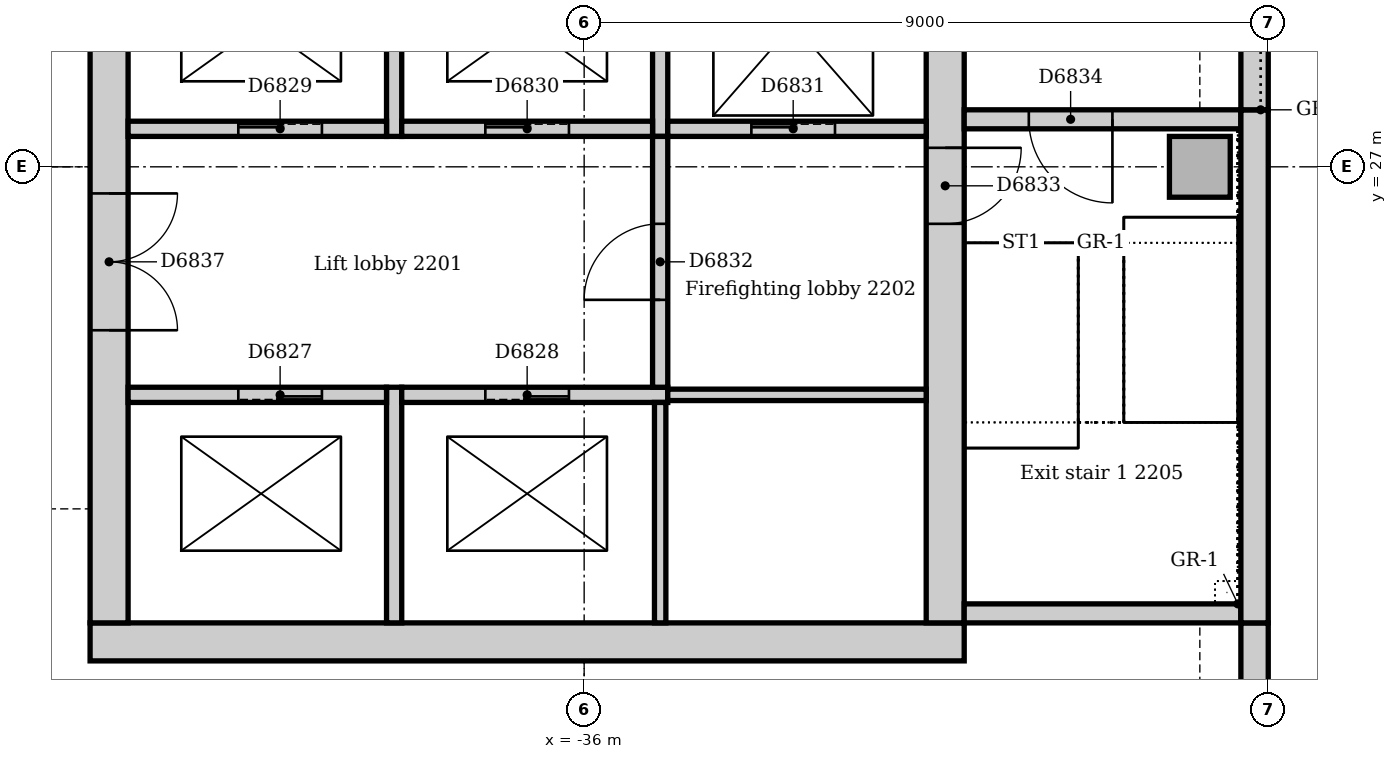
"""IFC4 building model, lengths in metres.
Left out: names, types, materials, properties, quantities, classifications, styles, units other than length and angle.
Written with IfcOpenShell. Run it as: python <this file> out.ifc"""

import sys

from ifc_helpers import new_model, si_unit, direction, frame, frame_2d, origin, origin_2d, place, context, subcontext, project, spatial, rectangle, extrude, element, fill, save


model = new_model("IFC4")
c1 = context("Model", 3, precision=1e-05, world=origin(), true_north=direction((0.0, 1.0)))
c2 = subcontext(c1, "Body", "Model", "MODEL_VIEW")
j1 = project(units=[si_unit("LENGTHUNIT", "METRE"), si_unit("PLANEANGLEUNIT", "RADIAN")], contexts=[c1])
p1 = place(None, origin())
s1 = spatial("IfcSite", under=j1, at=p1, CompositionType="ELEMENT")
p2 = place(p1, origin())
s2 = spatial("IfcBuilding", under=s1, at=p2, CompositionType="ELEMENT")
p3 = place(p2, frame((0.0, 0.0, 95.0)))
s3 = spatial("IfcBuildingStorey", under=s2, at=p3, CompositionType="ELEMENT", Elevation=95.0)
p4 = place(p3, frame((-42.5, 20.75, 0.0), z_axis=(0.0, 0.0, 1.0), x_axis=(1.0, 0.0, 0.0)))
e1 = element("IfcWall", 1, at=p4, inside=s3, PredefinedType="SOLIDWALL", context=c2, shape_type="SweptSolid", body=[
    extrude(rectangle(XDim=11.5, YDim=0.5, at=frame_2d((5.75, 0.0))), origin(), (0.0, 0.0, 1.0), 5.0),
])
p5 = place(p3, frame((-31.25, 21.0, 0.0), z_axis=(0.0, 0.0, 1.0), x_axis=(0.0, 1.0, 0.0)))
e2 = element("IfcWall", 2, at=p5, inside=s3, PredefinedType="SOLIDWALL", context=c2, shape_type="SweptSolid", body=[
    extrude(rectangle(XDim=9.5, YDim=0.5, at=frame_2d((4.75, 0.0))), origin(), (0.0, 0.0, 1.0), 5.0),
])
p6 = place(p5, frame((5.25, 0.0, 0.0)))
e3 = element("IfcOpeningElement", 3, at=p6, cuts=e2, PredefinedType="OPENING", context=c2, shape_type="SweptSolid", body=[
    extrude(rectangle(XDim=1.0, YDim=2.1, at=frame_2d((0.5, 1.05))), frame((0.0, 0.26, 0.0), z_axis=(0.0, -1.0, 0.0), x_axis=(1.0, 0.0, 0.0)), (0.0, 0.0, 1.0), 0.52),
])
p7 = place(p3, frame((-42.25, 30.5, 0.0), z_axis=(0.0, 0.0, 1.0), x_axis=(0.0, -1.0, 0.0)))
e4 = element("IfcWall", 4, at=p7, inside=s3, PredefinedType="SOLIDWALL", context=c2, shape_type="SweptSolid", body=[
    extrude(rectangle(XDim=9.5, YDim=0.5, at=frame_2d((4.75, 0.0))), origin(), (0.0, 0.0, 1.0), 5.0),
])
p8 = place(p7, frame((3.85, 0.0, 0.0)))
e5 = element("IfcOpeningElement", 5, at=p8, cuts=e4, PredefinedType="OPENING", context=c2, shape_type="SweptSolid", body=[
    extrude(rectangle(XDim=1.8, YDim=2.1, at=frame_2d((0.9, 1.05))), frame((0.0, 0.26, 0.0), z_axis=(0.0, -1.0, 0.0), x_axis=(1.0, 0.0, 0.0)), (0.0, 0.0, 1.0), 0.52),
])
p9 = place(p3, frame((-31.0, 21.125, 0.0), z_axis=(0.0, 0.0, 1.0), x_axis=(1.0, 0.0, 0.0)))
e6 = element("IfcWall", 6, at=p9, inside=s3, PredefinedType="SOLIDWALL", context=c2, shape_type="SweptSolid", body=[
    extrude(rectangle(XDim=3.64, YDim=0.25, at=frame_2d((1.82, 0.0))), origin(), (0.0, 0.0, 1.0), 5.0),
])
p10 = place(p3, frame((-27.36, 27.625, 0.0), z_axis=(0.0, 0.0, 1.0), x_axis=(-1.0, 0.0, 0.0)))
e7 = element("IfcWall", 7, at=p10, inside=s3, PredefinedType="SOLIDWALL", context=c2, shape_type="SweptSolid", body=[
    extrude(rectangle(XDim=3.64, YDim=0.25, at=frame_2d((1.82, 0.0))), origin(), (0.0, 0.0, 1.0), 5.0),
])
p11 = place(p10, frame((1.69, 0.0, 0.0)))
e8 = element("IfcOpeningElement", 8, at=p11, cuts=e7, PredefinedType="OPENING", context=c2, shape_type="SweptSolid", body=[
    extrude(rectangle(XDim=1.1, YDim=2.1, at=frame_2d((0.55, 1.05))), frame((0.0, 0.135, 0.0), z_axis=(0.0, -1.0, 0.0), x_axis=(1.0, 0.0, 0.0)), (0.0, 0.0, 1.0), 0.27),
])
p12 = place(p3, frame((-27.9, 27.0, 0.0), z_axis=(0.0, 0.0, 1.0), x_axis=(1.0, 0.0, 0.0)))
e9 = element("IfcColumn", 9, at=p12, inside=s3, PredefinedType="COLUMN", context=c2, shape_type="SweptSolid", body=[
    extrude(rectangle(XDim=0.8, YDim=0.8, at=origin_2d()), origin(), (0.0, 0.0, 1.0), 5.0),
])
p13 = place(p3, frame((-27.18, 13.243, 0.0), z_axis=(0.0, 0.0, 1.0), x_axis=(0.0, 1.0, 0.0)))
e10 = element("IfcWall", 10, at=p13, inside=s3, PredefinedType="STANDARD", context=c2, shape_type="SweptSolid", body=[
    extrude(rectangle(XDim=7.757, YDim=0.36, at=frame_2d((3.879, 0.0))), origin(), (0.0, 0.0, 1.0), 4.85),
])
p14 = place(p13, frame((3.404, 0.0, 0.9)))
e11 = element("IfcOpeningElement", 11, at=p14, cuts=e10, PredefinedType="OPENING", context=c2, shape_type="SweptSolid", body=[
    extrude(rectangle(XDim=1.8, YDim=2.2, at=frame_2d((0.9, 1.1))), frame((0.0, 0.19, 0.0), z_axis=(0.0, -1.0, 0.0), x_axis=(1.0, 0.0, 0.0)), (0.0, 0.0, 1.0), 0.38),
])
p15 = place(p3, frame((-27.18, 21.0, 0.0), z_axis=(0.0, 0.0, 1.0), x_axis=(0.0, 1.0, 0.0)))
e12 = element("IfcWall", 12, at=p15, inside=s3, PredefinedType="STANDARD", context=c2, shape_type="SweptSolid", body=[
    extrude(rectangle(XDim=6.75, YDim=0.36, at=frame_2d((3.375, 0.0))), origin(), (0.0, 0.0, 1.0), 4.85),
])
p16 = place(p3, frame((-27.18, 27.75, 0.0), z_axis=(0.0, 0.0, 1.0), x_axis=(0.0, 1.0, 0.0)))
e13 = element("IfcWall", 13, at=p16, inside=s3, PredefinedType="STANDARD", context=c2, shape_type="SweptSolid", body=[
    extrude(rectangle(XDim=7.5, YDim=0.36, at=frame_2d((3.75, 0.0))), origin(), (0.0, 0.0, 1.0), 4.85),
])
p17 = place(p16, frame((2.85, 0.0, 1.2)))
e14 = element("IfcOpeningElement", 14, at=p17, cuts=e13, PredefinedType="OPENING", context=c2, shape_type="SweptSolid", body=[
    extrude(rectangle(XDim=1.8, YDim=1.2, at=frame_2d((0.9, 0.6))), frame((0.0, 0.19, 0.0), z_axis=(0.0, -1.0, 0.0), x_axis=(1.0, 0.0, 0.0)), (0.0, 0.0, 1.0), 0.38),
])
p18 = place(p3, frame((-38.5, 21.0, 0.0), z_axis=(0.0, 0.0, 1.0), x_axis=(0.0, 1.0, 0.0)))
e15 = element("IfcWall", 15, at=p18, inside=s3, PredefinedType="SOLIDWALL", context=c2, shape_type="SweptSolid", body=[
    extrude(rectangle(XDim=3.1, YDim=0.2, at=frame_2d((1.55, 0.0))), origin(), (0.0, 0.0, 1.0), 5.0),
])
p19 = place(p3, frame((-38.6, 24.0, 0.0), z_axis=(0.0, 0.0, 1.0), x_axis=(-1.0, 0.0, 0.0)))
e16 = element("IfcWall", 16, at=p19, inside=s3, PredefinedType="SOLIDWALL", context=c2, shape_type="SweptSolid", body=[
    extrude(rectangle(XDim=3.4, YDim=0.2, at=frame_2d((1.7, 0.0))), origin(), (0.0, 0.0, 1.0), 5.0),
])
p20 = place(p19, frame((0.85, 0.0, 0.0)))
e17 = element("IfcOpeningElement", 17, at=p20, cuts=e16, PredefinedType="OPENING", context=c2, shape_type="SweptSolid", body=[
    extrude(rectangle(XDim=1.1, YDim=2.1, at=frame_2d((0.55, 1.05))), frame((0.0, 0.11, 0.0), z_axis=(0.0, -1.0, 0.0), x_axis=(1.0, 0.0, 0.0)), (0.0, 0.0, 1.0), 0.22),
])
p21 = place(p3, frame((-34.9, 24.0, 0.0), z_axis=(0.0, 0.0, 1.0), x_axis=(-1.0, 0.0, 0.0)))
e18 = element("IfcWall", 18, at=p21, inside=s3, PredefinedType="SOLIDWALL", context=c2, shape_type="SweptSolid", body=[
    extrude(rectangle(XDim=3.5, YDim=0.2, at=frame_2d((1.75, 0.0))), origin(), (0.0, 0.0, 1.0), 5.0),
])
p22 = place(p21, frame((1.3, 0.0, 0.0)))
e19 = element("IfcOpeningElement", 19, at=p22, cuts=e18, PredefinedType="OPENING", context=c2, shape_type="SweptSolid", body=[
    extrude(rectangle(XDim=1.1, YDim=2.1, at=frame_2d((0.55, 1.05))), frame((0.0, 0.11, 0.0), z_axis=(0.0, -1.0, 0.0), x_axis=(1.0, 0.0, 0.0)), (0.0, 0.0, 1.0), 0.22),
])
p23 = place(p3, frame((-38.5, 27.4, 0.0), z_axis=(0.0, 0.0, 1.0), x_axis=(0.0, 1.0, 0.0)))
e20 = element("IfcWall", 20, at=p23, inside=s3, PredefinedType="SOLIDWALL", context=c2, shape_type="SweptSolid", body=[
    extrude(rectangle(XDim=2.85, YDim=0.2, at=frame_2d((1.425, 0.0))), origin(), (0.0, 0.0, 1.0), 5.0),
])
p24 = place(p3, frame((-42.0, 27.5, 0.0), z_axis=(0.0, 0.0, 1.0), x_axis=(1.0, 0.0, 0.0)))
e21 = element("IfcWall", 21, at=p24, inside=s3, PredefinedType="SOLIDWALL", context=c2, shape_type="SweptSolid", body=[
    extrude(rectangle(XDim=3.4, YDim=0.2, at=frame_2d((1.7, 0.0))), origin(), (0.0, 0.0, 1.0), 5.0),
])
p25 = place(p24, frame((1.45, 0.0, 0.0)))
e22 = element("IfcOpeningElement", 22, at=p25, cuts=e21, PredefinedType="OPENING", context=c2, shape_type="SweptSolid", body=[
    extrude(rectangle(XDim=1.1, YDim=2.1, at=frame_2d((0.55, 1.05))), frame((0.0, 0.11, 0.0), z_axis=(0.0, -1.0, 0.0), x_axis=(1.0, 0.0, 0.0)), (0.0, 0.0, 1.0), 0.22),
])
p26 = place(p3, frame((-35.0, 27.4, 0.0), z_axis=(0.0, 0.0, 1.0), x_axis=(0.0, 1.0, 0.0)))
e23 = element("IfcWall", 23, at=p26, inside=s3, PredefinedType="SOLIDWALL", context=c2, shape_type="SweptSolid", body=[
    extrude(rectangle(XDim=2.85, YDim=0.2, at=frame_2d((1.425, 0.0))), origin(), (0.0, 0.0, 1.0), 5.0),
])
p27 = place(p3, frame((-38.4, 27.5, 0.0), z_axis=(0.0, 0.0, 1.0), x_axis=(1.0, 0.0, 0.0)))
e24 = element("IfcWall", 24, at=p27, inside=s3, PredefinedType="SOLIDWALL", context=c2, shape_type="SweptSolid", body=[
    extrude(rectangle(XDim=3.3, YDim=0.2, at=frame_2d((1.65, 0.0))), origin(), (0.0, 0.0, 1.0), 5.0),
])
p28 = place(p27, frame((1.1, 0.0, 0.0)))
e25 = element("IfcOpeningElement", 25, at=p28, cuts=e24, PredefinedType="OPENING", context=c2, shape_type="SweptSolid", body=[
    extrude(rectangle(XDim=1.1, YDim=2.1, at=frame_2d((0.55, 1.05))), frame((0.0, 0.11, 0.0), z_axis=(0.0, -1.0, 0.0), x_axis=(1.0, 0.0, 0.0)), (0.0, 0.0, 1.0), 0.22),
])
p29 = place(p3, frame((-34.9, 27.5, 0.0), z_axis=(0.0, 0.0, 1.0), x_axis=(1.0, 0.0, 0.0)))
e26 = element("IfcWall", 26, at=p29, inside=s3, PredefinedType="SOLIDWALL", context=c2, shape_type="SweptSolid", body=[
    extrude(rectangle(XDim=3.4, YDim=0.2, at=frame_2d((1.7, 0.0))), origin(), (0.0, 0.0, 1.0), 5.0),
])
p30 = place(p29, frame((1.1, 0.0, 0.0)))
e27 = element("IfcOpeningElement", 27, at=p30, cuts=e26, PredefinedType="OPENING", context=c2, shape_type="SweptSolid", body=[
    extrude(rectangle(XDim=1.1, YDim=2.1, at=frame_2d((0.55, 1.05))), frame((0.0, 0.11, 0.0), z_axis=(0.0, -1.0, 0.0), x_axis=(1.0, 0.0, 0.0)), (0.0, 0.0, 1.0), 0.22),
])
p31 = place(p3, frame((-35.0, 24.1, 0.0), z_axis=(0.0, 0.0, 1.0), x_axis=(0.0, 1.0, 0.0)))
e28 = element("IfcWall", 28, at=p31, inside=s3, PredefinedType="SOLIDWALL", context=c2, shape_type="SweptSolid", body=[
    extrude(rectangle(XDim=3.3, YDim=0.2, at=frame_2d((1.65, 0.0))), origin(), (0.0, 0.0, 1.0), 5.0),
])
p32 = place(p31, frame((1.15, 0.0, 0.0)))
e29 = element("IfcOpeningElement", 29, at=p32, cuts=e28, PredefinedType="OPENING", context=c2, shape_type="SweptSolid", body=[
    extrude(rectangle(XDim=1.0, YDim=2.1, at=frame_2d((0.5, 1.05))), frame((0.0, 0.11, 0.0), z_axis=(0.0, -1.0, 0.0), x_axis=(1.0, 0.0, 0.0)), (0.0, 0.0, 1.0), 0.22),
])
p33 = place(p3, frame((-35.0, 21.0, 0.0), z_axis=(0.0, 0.0, 1.0), x_axis=(0.0, 1.0, 0.0)))
e30 = element("IfcWall", 30, at=p33, inside=s3, PredefinedType="SOLIDWALL", context=c2, shape_type="SweptSolid", body=[
    extrude(rectangle(XDim=2.9, YDim=0.15, at=frame_2d((1.45, 0.0))), origin(), (0.0, 0.0, 1.0), 5.0),
])
p34 = place(p3, frame((-31.5, 24.0, 0.0), z_axis=(0.0, 0.0, 1.0), x_axis=(-1.0, 0.0, 0.0)))
e31 = element("IfcWall", 31, at=p34, inside=s3, PredefinedType="SOLIDWALL", context=c2, shape_type="SweptSolid", body=[
    extrude(rectangle(XDim=3.4, YDim=0.15, at=frame_2d((1.7, 0.0))), origin(), (0.0, 0.0, 1.0), 5.0),
])
p35 = place(p20, origin())
e32 = element("IfcDoor", 32, at=p35, inside=s3, OperationType="SLIDING_TO_LEFT", PredefinedType="DOOR", context=c2, shape_type="SweptSolid", body=[
    extrude(rectangle(XDim=1.1, YDim=2.1, at=frame_2d((0.55, 1.05))), frame((0.0, 0.025, 0.0), z_axis=(0.0, -1.0, 0.0), x_axis=(1.0, 0.0, 0.0)), (0.0, 0.0, 1.0), 0.05),
])
fill(e17, e32)
p36 = place(p22, origin())
e33 = element("IfcDoor", 33, at=p36, inside=s3, OperationType="SLIDING_TO_LEFT", PredefinedType="DOOR", context=c2, shape_type="SweptSolid", body=[
    extrude(rectangle(XDim=1.1, YDim=2.1, at=frame_2d((0.55, 1.05))), frame((0.0, 0.025, 0.0), z_axis=(0.0, -1.0, 0.0), x_axis=(1.0, 0.0, 0.0)), (0.0, 0.0, 1.0), 0.05),
])
fill(e19, e33)
p37 = place(p25, origin())
e34 = element("IfcDoor", 34, at=p37, inside=s3, OperationType="SLIDING_TO_LEFT", PredefinedType="DOOR", context=c2, shape_type="SweptSolid", body=[
    extrude(rectangle(XDim=1.1, YDim=2.1, at=frame_2d((0.55, 1.05))), frame((0.0, 0.025, 0.0), z_axis=(0.0, -1.0, 0.0), x_axis=(1.0, 0.0, 0.0)), (0.0, 0.0, 1.0), 0.05),
])
fill(e22, e34)
p38 = place(p28, origin())
e35 = element("IfcDoor", 35, at=p38, inside=s3, OperationType="SLIDING_TO_LEFT", PredefinedType="DOOR", context=c2, shape_type="SweptSolid", body=[
    extrude(rectangle(XDim=1.1, YDim=2.1, at=frame_2d((0.55, 1.05))), frame((0.0, 0.025, 0.0), z_axis=(0.0, -1.0, 0.0), x_axis=(1.0, 0.0, 0.0)), (0.0, 0.0, 1.0), 0.05),
])
fill(e25, e35)
p39 = place(p30, origin())
e36 = element("IfcDoor", 36, at=p39, inside=s3, OperationType="SLIDING_TO_LEFT", PredefinedType="DOOR", context=c2, shape_type="SweptSolid", body=[
    extrude(rectangle(XDim=1.1, YDim=2.1, at=frame_2d((0.55, 1.05))), frame((0.0, 0.025, 0.0), z_axis=(0.0, -1.0, 0.0), x_axis=(1.0, 0.0, 0.0)), (0.0, 0.0, 1.0), 0.05),
])
fill(e27, e36)
p40 = place(p32, origin())
e37 = element("IfcDoor", 37, at=p40, inside=s3, OperationType="SINGLE_SWING_LEFT", PredefinedType="DOOR", context=c2, shape_type="SweptSolid", body=[
    extrude(rectangle(XDim=1.0, YDim=2.1, at=frame_2d((0.5, 1.05))), frame((0.0, 0.025, 0.0), z_axis=(0.0, -1.0, 0.0), x_axis=(1.0, 0.0, 0.0)), (0.0, 0.0, 1.0), 0.05),
])
fill(e29, e37)
p41 = place(p6, frame((1.0, 0.0, 0.0), z_axis=(0.0, 0.0, 1.0), x_axis=(-1.0, 0.0, 0.0)))
e38 = element("IfcDoor", 38, at=p41, inside=s3, OperationType="SINGLE_SWING_LEFT", PredefinedType="DOOR", context=c2, shape_type="SweptSolid", body=[
    extrude(rectangle(XDim=1.0, YDim=2.1, at=frame_2d((0.5, 1.05))), frame((0.0, 0.025, 0.0), z_axis=(0.0, -1.0, 0.0), x_axis=(1.0, 0.0, 0.0)), (0.0, 0.0, 1.0), 0.05),
])
fill(e3, e38)
p42 = place(p11, origin())
e39 = element("IfcDoor", 39, at=p42, inside=s3, OperationType="SINGLE_SWING_LEFT", PredefinedType="DOOR", context=c2, shape_type="SweptSolid", body=[
    extrude(rectangle(XDim=1.1, YDim=2.1, at=frame_2d((0.55, 1.05))), frame((0.0, 0.025, 0.0), z_axis=(0.0, -1.0, 0.0), x_axis=(1.0, 0.0, 0.0)), (0.0, 0.0, 1.0), 0.05),
])
fill(e8, e39)
p43 = place(p8, origin())
e40 = element("IfcDoor", 40, at=p43, inside=s3, OperationType="DOUBLE_DOOR_SINGLE_SWING", PredefinedType="DOOR", context=c2, shape_type="SweptSolid", body=[
    extrude(rectangle(XDim=1.8, YDim=2.1, at=frame_2d((0.9, 1.05))), frame((0.0, 0.025, 0.0), z_axis=(0.0, -1.0, 0.0), x_axis=(1.0, 0.0, 0.0)), (0.0, 0.0, 1.0), 0.05),
])
fill(e5, e40)
save(model, sys.argv[1])
